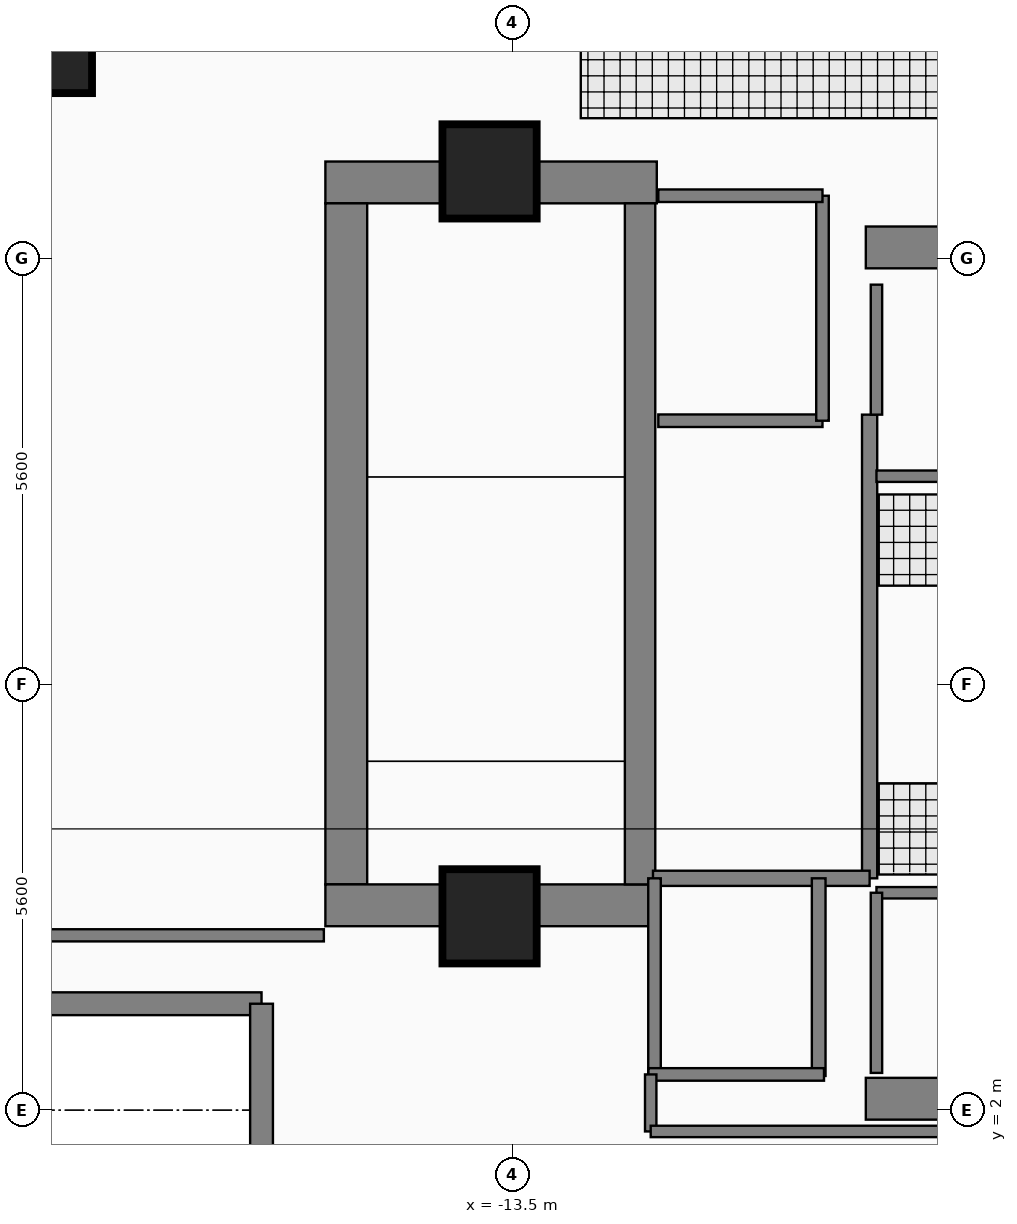
"""IFC4 building model, lengths in metres.
Left out: names, types, materials, properties, quantities, classifications, styles, units other than length and angle.
Written with IfcOpenShell. Run it as: python <this file> out.ifc"""

import sys

from ifc_helpers import new_model, si_unit, direction, frame, frame_2d, origin, origin_2d, place, context, subcontext, project, spatial, rectangle, extrude, element, fill, save


model = new_model("IFC4")
c1 = context("Model", 3, precision=1e-05, world=origin(), true_north=direction((0.0, 1.0)))
c2 = subcontext(c1, "Body", "Model", "MODEL_VIEW")
j1 = project(units=[si_unit("LENGTHUNIT", "METRE"), si_unit("PLANEANGLEUNIT", "RADIAN")], contexts=[c1])
p1 = place(None, origin())
s1 = spatial("IfcSite", under=j1, at=p1, CompositionType="ELEMENT")
p2 = place(p1, origin())
s2 = spatial("IfcBuilding", under=s1, at=p2, CompositionType="ELEMENT")
p3 = place(p2, frame((0.0, 0.0, 284.05)))
s3 = spatial("IfcBuildingStorey", under=s2, at=p3, CompositionType="ELEMENT", Elevation=284.05)
p4 = place(p3, frame((-15.96, 14.205, 0.0), z_axis=(0.0, 0.0, 1.0), x_axis=(1.0, 0.0, 0.0)))
e1 = element("IfcWall", 1, at=p4, inside=s3, PredefinedType="SHEAR", context=c2, shape_type="SweptSolid", body=[
    extrude(rectangle(XDim=4.36, YDim=0.55, at=frame_2d((2.18, 0.0))), origin(), (0.0, 0.0, 1.0), 4.21),
])
p5 = place(p3, frame((-15.685, 4.97, 0.0), z_axis=(0.0, 0.0, 1.0), x_axis=(0.0, 1.0, 0.0)))
e2 = element("IfcWall", 2, at=p5, inside=s3, PredefinedType="SHEAR", context=c2, shape_type="SweptSolid", body=[
    extrude(rectangle(XDim=8.96, YDim=0.55, at=frame_2d((4.48, 0.0))), origin(), (0.0, 0.0, 1.0), 4.21),
])
p6 = place(p3, frame((-15.96, 4.695, 0.0), z_axis=(0.0, 0.0, 1.0), x_axis=(1.0, 0.0, 0.0)))
e3 = element("IfcWall", 3, at=p6, inside=s3, PredefinedType="SHEAR", context=c2, shape_type="SweptSolid", body=[
    extrude(rectangle(XDim=4.36, YDim=0.55, at=frame_2d((2.18, 0.0))), origin(), (0.0, 0.0, 1.0), 4.21),
])
for number, where, z_axis, x_axis in (
    (4, (-8.85, 2.15, 0.0), (0.0, 0.0, 1.0), (1.0, 0.0, 0.0)),
    (5, (-8.85, 13.35, 0.0), (0.0, 0.0, 1.0), (1.0, 0.0, 0.0)),
):
    element("IfcWall", number, at=place(p3, frame(where, z_axis=z_axis, x_axis=x_axis)), inside=s3, PredefinedType="SHEAR", context=c2, shape_type="SweptSolid", body=[
        extrude(rectangle(XDim=7.6, YDim=0.55, at=frame_2d((3.8, 0.0))), origin(), (0.0, 0.0, 1.0), 4.18),
    ])
p7 = place(p3, frame((-11.82, 4.97, 0.0), z_axis=(0.0, 0.0, 1.0), x_axis=(0.0, 1.0, 0.0)))
e6 = element("IfcWall", 6, at=p7, inside=s3, PredefinedType="SHEAR", context=c2, shape_type="SweptSolid", body=[
    extrude(rectangle(XDim=8.96, YDim=0.4, at=frame_2d((4.48, 0.0))), origin(), (0.0, 0.0, 1.0), 4.21),
])
p8 = place(p7, frame((0.31, 0.0, 0.0)))
e7 = element("IfcOpeningElement", 7, at=p8, cuts=e6, PredefinedType="OPENING", context=c2, shape_type="SweptSolid", body=[
    extrude(rectangle(XDim=1.12, YDim=2.22, at=frame_2d((0.56, 1.11))), frame((0.0, 0.21, 0.0), z_axis=(0.0, -1.0, 0.0), x_axis=(1.0, 0.0, 0.0)), (0.0, 0.0, 1.0), 0.42),
])
for number, where, z_axis, x_axis in (
    (8, (-13.8, 14.35, 0.0), (0.0, 0.0, 1.0), (1.0, 0.0, 0.0)),
    (9, (-13.8, 4.55, 0.0), (0.0, 0.0, 1.0), (1.0, 0.0, 0.0)),
):
    element("IfcColumn", number, at=place(p3, frame(where, z_axis=z_axis, x_axis=x_axis)), inside=s3, PredefinedType="COLUMN", context=c2, shape_type="SweptSolid", body=[
        extrude(rectangle(XDim=1.2, YDim=1.2, at=origin_2d()), origin(), (0.0, 0.0, 1.0), 4.4),
    ])
p9 = place(p3, frame((-19.55, 15.9, 0.0), z_axis=(0.0, 0.0, 1.0), x_axis=(1.0, 0.0, 0.0)))
e10 = element("IfcColumn", 10, at=p9, inside=s3, PredefinedType="COLUMN", context=c2, shape_type="SweptSolid", body=[
    extrude(rectangle(XDim=1.0, YDim=1.0, at=origin_2d()), origin(), (0.0, 0.0, 1.0), 4.4),
])
p10 = place(p3, frame((-16.8, 3.4, 0.0), z_axis=(0.0, 0.0, 1.0), x_axis=(-1.0, 0.0, 0.0)))
e11 = element("IfcWall", 11, at=p10, inside=s3, PredefinedType="STANDARD", context=c2, shape_type="SweptSolid", body=[
    extrude(rectangle(XDim=3.4, YDim=0.3, at=frame_2d((1.7, 0.0))), origin(), (0.0, 0.0, 1.0), 4.18),
])
p11 = place(p10, frame((1.125, 0.0, 1.25)))
e12 = element("IfcOpeningElement", 12, at=p11, cuts=e11, PredefinedType="OPENING", context=c2, shape_type="SweptSolid", body=[
    extrude(rectangle(XDim=1.15, YDim=1.55, at=frame_2d((0.575, 0.775))), frame((0.0, 0.16, 0.0), z_axis=(0.0, -1.0, 0.0), x_axis=(1.0, 0.0, 0.0)), (0.0, 0.0, 1.0), 0.32),
])
p12 = place(p3, frame((-16.8, 0.0, 0.0), z_axis=(0.0, 0.0, 1.0), x_axis=(0.0, 1.0, 0.0)))
e13 = element("IfcWall", 13, at=p12, inside=s3, PredefinedType="STANDARD", context=c2, shape_type="SweptSolid", body=[
    extrude(rectangle(XDim=3.4, YDim=0.3, at=frame_2d((1.7, 0.0))), origin(), (0.0, 0.0, 1.0), 4.18),
])
p13 = place(p12, frame((0.22, 0.0, 0.0)))
e14 = element("IfcOpeningElement", 14, at=p13, cuts=e13, PredefinedType="OPENING", context=c2, shape_type="SweptSolid", body=[
    extrude(rectangle(XDim=1.05, YDim=2.2, at=frame_2d((0.525, 1.1))), frame((0.0, 0.16, 0.0), z_axis=(0.0, -1.0, 0.0), x_axis=(1.0, 0.0, 0.0)), (0.0, 0.0, 1.0), 0.32),
])
p14 = place(p3, frame((-8.8, 5.05, 0.0), z_axis=(0.0, 0.0, 1.0), x_axis=(0.0, 1.0, 0.0)))
e15 = element("IfcWall", 15, at=p14, inside=s3, PredefinedType="PARTITIONING", context=c2, shape_type="SweptSolid", body=[
    extrude(rectangle(XDim=6.1, YDim=0.2, at=frame_2d((3.05, 0.0))), origin(), (0.0, 0.0, 1.0), 4.18),
])
p15 = place(p14, frame((0.25, 0.0, 0.0)))
e16 = element("IfcOpeningElement", 16, at=p15, cuts=e15, PredefinedType="OPENING", context=c2, shape_type="SweptSolid", body=[
    extrude(rectangle(XDim=1.1, YDim=2.2, at=frame_2d((0.55, 1.1))), frame((0.0, 0.11, 0.0), z_axis=(0.0, -1.0, 0.0), x_axis=(1.0, 0.0, 0.0)), (0.0, 0.0, 1.0), 0.22),
])
p16 = place(p14, frame((3.85, 0.0, 0.0)))
e17 = element("IfcOpeningElement", 17, at=p16, cuts=e15, PredefinedType="OPENING", context=c2, shape_type="SweptSolid", body=[
    extrude(rectangle(XDim=1.1, YDim=2.2, at=frame_2d((0.55, 1.1))), frame((0.0, 0.11, 0.0), z_axis=(0.0, -1.0, 0.0), x_axis=(1.0, 0.0, 0.0)), (0.0, 0.0, 1.0), 0.22),
])
p17 = place(p3, frame((-11.58, 11.07, 0.0), z_axis=(0.0, 0.0, 1.0), x_axis=(1.0, 0.0, 0.0)))
e18 = element("IfcWall", 18, at=p17, inside=s3, PredefinedType="PARTITIONING", context=c2, shape_type="SweptSolid", body=[
    extrude(rectangle(XDim=2.16, YDim=0.165, at=frame_2d((1.08, 0.0))), origin(), (0.0, 0.0, 1.0), 4.18),
])
p18 = place(p17, frame((0.53, 0.0, 0.0)))
e19 = element("IfcOpeningElement", 19, at=p18, cuts=e18, PredefinedType="OPENING", context=c2, shape_type="SweptSolid", body=[
    extrude(rectangle(XDim=1.15, YDim=2.25, at=frame_2d((0.575, 1.125))), frame((0.0, 0.093, 0.0), z_axis=(0.0, -1.0, 0.0), x_axis=(1.0, 0.0, 0.0)), (0.0, 0.0, 1.0), 0.185),
])
p19 = place(p3, frame((-8.71, 4.86, 0.0), z_axis=(0.0, 0.0, 1.0), x_axis=(1.0, 0.0, 0.0)))
e20 = element("IfcWall", 20, at=p19, inside=s3, PredefinedType="PARTITIONING", context=c2, shape_type="SweptSolid", body=[
    extrude(rectangle(XDim=4.22, YDim=0.15, at=frame_2d((2.11, 0.0))), origin(), (0.0, 0.0, 1.0), 4.18),
])
p20 = place(p19, frame((1.66, 0.0, 0.0)))
e21 = element("IfcOpeningElement", 21, at=p20, cuts=e20, PredefinedType="OPENING", context=c2, shape_type="SweptSolid", body=[
    extrude(rectangle(XDim=0.9, YDim=2.15, at=frame_2d((0.45, 1.075))), frame((0.0, 0.085, 0.0), z_axis=(0.0, -1.0, 0.0), x_axis=(1.0, 0.0, 0.0)), (0.0, 0.0, 1.0), 0.17),
])
p21 = place(p3, frame((-8.71, 10.34, 0.0), z_axis=(0.0, 0.0, 1.0), x_axis=(1.0, 0.0, 0.0)))
e22 = element("IfcWall", 22, at=p21, inside=s3, PredefinedType="PARTITIONING", context=c2, shape_type="SweptSolid", body=[
    extrude(rectangle(XDim=3.57, YDim=0.15, at=frame_2d((1.785, 0.0))), origin(), (0.0, 0.0, 1.0), 4.18),
])
p22 = place(p21, frame((1.335, 0.0, 0.0)))
e23 = element("IfcOpeningElement", 23, at=p22, cuts=e22, PredefinedType="OPENING", context=c2, shape_type="SweptSolid", body=[
    extrude(rectangle(XDim=0.9, YDim=2.15, at=frame_2d((0.45, 1.075))), frame((0.0, 0.085, 0.0), z_axis=(0.0, -1.0, 0.0), x_axis=(1.0, 0.0, 0.0)), (0.0, 0.0, 1.0), 0.17),
])
p23 = place(p3, frame((-20.14, 4.3, 0.0), z_axis=(0.0, 0.0, 1.0), x_axis=(1.0, 0.0, 0.0)))
e24 = element("IfcWall", 24, at=p23, inside=s3, PredefinedType="PARTITIONING", context=c2, shape_type="SweptSolid", body=[
    extrude(rectangle(XDim=4.16, YDim=0.16, at=frame_2d((2.08, 0.0))), origin(), (0.0, 0.0, 1.0), 4.18),
])
p24 = place(p23, frame((1.605, 0.0, 0.0)))
e25 = element("IfcOpeningElement", 25, at=p24, cuts=e24, PredefinedType="OPENING", context=c2, shape_type="SweptSolid", body=[
    extrude(rectangle(XDim=0.95, YDim=2.15, at=frame_2d((0.475, 1.075))), frame((0.0, 0.09, 0.0), z_axis=(0.0, -1.0, 0.0), x_axis=(1.0, 0.0, 0.0)), (0.0, 0.0, 1.0), 0.18),
])
p25 = place(p3, frame((-11.65, 5.05, 0.0), z_axis=(0.0, 0.0, 1.0), x_axis=(1.0, 0.0, 0.0)))
e26 = element("IfcWall", 26, at=p25, inside=s3, PredefinedType="PARTITIONING", context=c2, shape_type="SweptSolid", body=[
    extrude(rectangle(XDim=2.85, YDim=0.2, at=frame_2d((1.425, 0.0))), origin(), (0.0, 0.0, 1.0), 4.18),
])
p26 = place(p3, frame((-9.42, 11.07, 0.0), z_axis=(0.0, 0.0, 1.0), x_axis=(0.0, 1.0, 0.0)))
e27 = element("IfcWall", 27, at=p26, inside=s3, PredefinedType="PARTITIONING", context=c2, shape_type="SweptSolid", body=[
    extrude(rectangle(XDim=2.96, YDim=0.165, at=frame_2d((1.48, 0.0))), origin(), (0.0, 0.0, 1.0), 4.18),
])
p27 = place(p3, frame((-11.58, 14.03, 0.0), z_axis=(0.0, 0.0, 1.0), x_axis=(1.0, 0.0, 0.0)))
e28 = element("IfcWall", 28, at=p27, inside=s3, PredefinedType="PARTITIONING", context=c2, shape_type="SweptSolid", body=[
    extrude(rectangle(XDim=2.16, YDim=0.165, at=frame_2d((1.08, 0.0))), origin(), (0.0, 0.0, 1.0), 4.18),
])
p28 = place(p3, frame((-8.71, 2.49, 0.0), z_axis=(0.0, 0.0, 1.0), x_axis=(0.0, 1.0, 0.0)))
e29 = element("IfcWall", 29, at=p28, inside=s3, PredefinedType="PARTITIONING", context=c2, shape_type="SweptSolid", body=[
    extrude(rectangle(XDim=2.37, YDim=0.15, at=frame_2d((1.185, 0.0))), origin(), (0.0, 0.0, 1.0), 4.18),
])
p29 = place(p3, frame((-8.71, 11.15, 0.0), z_axis=(0.0, 0.0, 1.0), x_axis=(0.0, 1.0, 0.0)))
e30 = element("IfcWall", 30, at=p29, inside=s3, PredefinedType="PARTITIONING", context=c2, shape_type="SweptSolid", body=[
    extrude(rectangle(XDim=1.71, YDim=0.15, at=frame_2d((0.855, 0.0))), origin(), (0.0, 0.0, 1.0), 4.18),
])
p30 = place(p3, frame((-9.47, 2.45, 0.0), z_axis=(0.0, 0.0, 1.0), x_axis=(0.0, 1.0, 0.0)))
e31 = element("IfcWall", 31, at=p30, inside=s3, PredefinedType="PARTITIONING", context=c2, shape_type="SweptSolid", body=[
    extrude(rectangle(XDim=2.6, YDim=0.18, at=frame_2d((1.3, 0.0))), origin(), (0.0, 0.0, 1.0), 4.18),
])
p31 = place(p3, frame((-11.63, 2.47, 0.0), z_axis=(0.0, 0.0, 1.0), x_axis=(0.0, 1.0, 0.0)))
e32 = element("IfcWall", 32, at=p31, inside=s3, PredefinedType="PARTITIONING", context=c2, shape_type="SweptSolid", body=[
    extrude(rectangle(XDim=2.58, YDim=0.165, at=frame_2d((1.29, 0.0))), origin(), (0.0, 0.0, 1.0), 4.18),
])
p32 = place(p3, frame((-11.71, 2.47, 0.0), z_axis=(0.0, 0.0, 1.0), x_axis=(1.0, 0.0, 0.0)))
e33 = element("IfcWall", 33, at=p32, inside=s3, PredefinedType="PARTITIONING", context=c2, shape_type="SweptSolid", body=[
    extrude(rectangle(XDim=2.31, YDim=0.165, at=frame_2d((1.155, 0.0))), origin(), (0.0, 0.0, 1.0), 3.08),
])
p33 = place(p3, frame((-11.68, 1.72, 0.0), z_axis=(0.0, 0.0, 1.0), x_axis=(0.0, 1.0, 0.0)))
e34 = element("IfcWall", 34, at=p33, inside=s3, PredefinedType="PARTITIONING", context=c2, shape_type="SweptSolid", body=[
    extrude(rectangle(XDim=0.75, YDim=0.15, at=frame_2d((0.375, 0.0))), origin(), (0.0, 0.0, 1.0), 4.18),
])
p34 = place(p3, frame((-11.68, 1.72, 0.0), z_axis=(0.0, 0.0, 1.0), x_axis=(1.0, 0.0, 0.0)))
e35 = element("IfcWall", 35, at=p34, inside=s3, PredefinedType="PARTITIONING", context=c2, shape_type="SweptSolid", body=[
    extrude(rectangle(XDim=11.68, YDim=0.15, at=frame_2d((5.84, 0.0))), origin(), (0.0, 0.0, 1.0), 3.08),
])
p35 = place(p11, origin())
e36 = element("IfcWindow", 36, at=p35, inside=s3, PartitioningType="SINGLE_PANEL", PredefinedType="WINDOW", context=c2, shape_type="SweptSolid", body=[
    extrude(rectangle(XDim=1.15, YDim=1.55, at=frame_2d((0.575, 0.775))), frame((0.0, 0.03, 0.0), z_axis=(0.0, -1.0, 0.0), x_axis=(1.0, 0.0, 0.0)), (0.0, 0.0, 1.0), 0.06),
])
fill(e12, e36)
p36 = place(p8, origin())
e37 = element("IfcDoor", 37, at=p36, inside=s3, OperationType="SINGLE_SWING_LEFT", PredefinedType="DOOR", context=c2, shape_type="SweptSolid", body=[
    extrude(rectangle(XDim=1.12, YDim=2.22, at=frame_2d((0.56, 1.11))), frame((0.0, 0.025, 0.0), z_axis=(0.0, -1.0, 0.0), x_axis=(1.0, 0.0, 0.0)), (0.0, 0.0, 1.0), 0.05),
])
fill(e7, e37)
p37 = place(p15, origin())
e38 = element("IfcDoor", 38, at=p37, inside=s3, OperationType="SINGLE_SWING_LEFT", PredefinedType="DOOR", context=c2, shape_type="SweptSolid", body=[
    extrude(rectangle(XDim=1.1, YDim=2.2, at=frame_2d((0.55, 1.1))), frame((0.0, 0.025, 0.0), z_axis=(0.0, -1.0, 0.0), x_axis=(1.0, 0.0, 0.0)), (0.0, 0.0, 1.0), 0.05),
])
fill(e16, e38)
p38 = place(p16, origin())
e39 = element("IfcDoor", 39, at=p38, inside=s3, OperationType="SINGLE_SWING_RIGHT", PredefinedType="DOOR", context=c2, shape_type="SweptSolid", body=[
    extrude(rectangle(XDim=1.1, YDim=2.2, at=frame_2d((0.55, 1.1))), frame((0.0, 0.025, 0.0), z_axis=(0.0, -1.0, 0.0), x_axis=(1.0, 0.0, 0.0)), (0.0, 0.0, 1.0), 0.05),
])
fill(e17, e39)
p39 = place(p18, origin())
e40 = element("IfcDoor", 40, at=p39, inside=s3, OperationType="SLIDING_TO_LEFT", PredefinedType="DOOR", context=c2, shape_type="SweptSolid", body=[
    extrude(rectangle(XDim=1.15, YDim=2.25, at=frame_2d((0.575, 1.125))), frame((0.0, 0.025, 0.0), z_axis=(0.0, -1.0, 0.0), x_axis=(1.0, 0.0, 0.0)), (0.0, 0.0, 1.0), 0.05),
])
fill(e19, e40)
p40 = place(p24, origin())
e41 = element("IfcDoor", 41, at=p40, inside=s3, OperationType="SINGLE_SWING_RIGHT", PredefinedType="DOOR", context=c2, shape_type="SweptSolid", body=[
    extrude(rectangle(XDim=0.95, YDim=2.15, at=frame_2d((0.475, 1.075))), frame((0.0, 0.025, 0.0), z_axis=(0.0, -1.0, 0.0), x_axis=(1.0, 0.0, 0.0)), (0.0, 0.0, 1.0), 0.05),
])
fill(e25, e41)
save(model, sys.argv[1])
